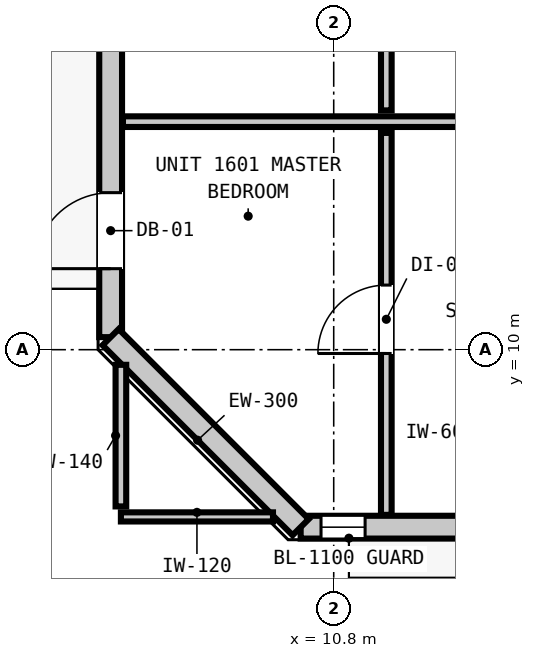
"""IFC4 building model, lengths in metres.
Left out: names, types, materials, properties, quantities, classifications, styles, units other than length and angle.
Written with IfcOpenShell. Run it as: python <this file> out.ifc"""

import sys

from ifc_helpers import new_model, si_unit, direction, frame, frame_2d, origin, place, context, subcontext, project, spatial, rectangle, extrude, element, fill, save


model = new_model("IFC4")
c1 = context("Model", 3, precision=1e-05, world=origin(), true_north=direction((0.0, 1.0)))
c2 = subcontext(c1, "Body", "Model", "MODEL_VIEW")
j1 = project(units=[si_unit("LENGTHUNIT", "METRE"), si_unit("PLANEANGLEUNIT", "RADIAN")], contexts=[c1])
p1 = place(None, origin())
s1 = spatial("IfcSite", under=j1, at=p1, CompositionType="ELEMENT")
p2 = place(p1, origin())
s2 = spatial("IfcBuilding", under=s1, at=p2, CompositionType="ELEMENT")
p3 = place(p2, frame((0.0, 0.0, 58.52)))
s3 = spatial("IfcBuildingStorey", under=s2, at=p3, CompositionType="ELEMENT", Elevation=58.52)
p4 = place(p3, frame((7.865, 10.165, 0.0), z_axis=(0.0, 0.0, 1.0), x_axis=(0.0, 1.0, 0.0)))
e1 = element("IfcWall", 1, at=p4, inside=s3, PredefinedType="STANDARD", context=c2, shape_type="SweptSolid", body=[
    extrude(rectangle(XDim=34.67, YDim=0.3, at=frame_2d((17.335, 0.0))), origin(), (0.0, 0.0, 1.0), 2.9),
])
p5 = place(p4, frame((0.901, 0.0, 0.0)))
e2 = element("IfcOpeningElement", 2, at=p5, cuts=e1, PredefinedType="OPENING", context=c2, shape_type="SweptSolid", body=[
    extrude(rectangle(XDim=1.0, YDim=2.15, at=frame_2d((0.5, 1.075))), frame((0.0, 0.16, 0.0), z_axis=(0.0, -1.0, 0.0), x_axis=(1.0, 0.0, 0.0)), (0.0, 0.0, 1.0), 0.32),
])
p6 = place(p4, frame((32.782, 0.0, 0.85)))
e3 = element("IfcOpeningElement", 3, at=p6, cuts=e1, PredefinedType="OPENING", context=c2, shape_type="SweptSolid", body=[
    extrude(rectangle(XDim=0.9, YDim=1.5, at=frame_2d((0.45, 0.75))), frame((0.0, 0.16, 0.0), z_axis=(0.0, -1.0, 0.0), x_axis=(1.0, 0.0, 0.0)), (0.0, 0.0, 1.0), 0.32),
])
p7 = place(p3, frame((47.835, 7.665, 0.0), z_axis=(0.0, 0.0, 1.0), x_axis=(-1.0, 0.0, 0.0)))
e4 = element("IfcWall", 4, at=p7, inside=s3, PredefinedType="STANDARD", context=c2, shape_type="SweptSolid", body=[
    extrude(rectangle(XDim=37.47, YDim=0.3, at=frame_2d((18.735, 0.0))), origin(), (0.0, 0.0, 1.0), 2.9),
])
p8 = place(p7, frame((0.901, 0.0, 0.0)))
e5 = element("IfcOpeningElement", 5, at=p8, cuts=e4, PredefinedType="OPENING", context=c2, shape_type="SweptSolid", body=[
    extrude(rectangle(XDim=1.0, YDim=2.15, at=frame_2d((0.5, 1.075))), frame((0.0, 0.16, 0.0), z_axis=(0.0, -1.0, 0.0), x_axis=(1.0, 0.0, 0.0)), (0.0, 0.0, 1.0), 0.32),
])
p9 = place(p7, frame((30.907, 0.0, 0.85)))
e6 = element("IfcOpeningElement", 6, at=p9, cuts=e4, PredefinedType="OPENING", context=c2, shape_type="SweptSolid", body=[
    extrude(rectangle(XDim=0.9, YDim=1.5, at=frame_2d((0.45, 0.75))), frame((0.0, 0.16, 0.0), z_axis=(0.0, -1.0, 0.0), x_axis=(1.0, 0.0, 0.0)), (0.0, 0.0, 1.0), 0.32),
])
p10 = place(p7, frame((36.622, 0.0, 0.85)))
e7 = element("IfcOpeningElement", 7, at=p10, cuts=e4, PredefinedType="OPENING", context=c2, shape_type="SweptSolid", body=[
    extrude(rectangle(XDim=0.58, YDim=1.5, at=frame_2d((0.29, 0.75))), frame((0.0, 0.16, 0.0), z_axis=(0.0, -1.0, 0.0), x_axis=(1.0, 0.0, 0.0)), (0.0, 0.0, 1.0), 0.32),
])
p11 = place(p7, frame((23.726, 0.0, 0.85)))
e8 = element("IfcOpeningElement", 8, at=p11, cuts=e4, PredefinedType="OPENING", context=c2, shape_type="SweptSolid", body=[
    extrude(rectangle(XDim=0.9, YDim=1.5, at=frame_2d((0.45, 0.75))), frame((0.0, 0.16, 0.0), z_axis=(0.0, -1.0, 0.0), x_axis=(1.0, 0.0, 0.0)), (0.0, 0.0, 1.0), 0.32),
])
p12 = place(p7, frame((16.046, 0.0, 0.85)))
e9 = element("IfcOpeningElement", 9, at=p12, cuts=e4, PredefinedType="OPENING", context=c2, shape_type="SweptSolid", body=[
    extrude(rectangle(XDim=0.9, YDim=1.5, at=frame_2d((0.45, 0.75))), frame((0.0, 0.16, 0.0), z_axis=(0.0, -1.0, 0.0), x_axis=(1.0, 0.0, 0.0)), (0.0, 0.0, 1.0), 0.32),
])
p13 = place(p7, frame((5.918, 0.0, 0.85)))
e10 = element("IfcOpeningElement", 10, at=p13, cuts=e4, PredefinedType="OPENING", context=c2, shape_type="SweptSolid", body=[
    extrude(rectangle(XDim=0.9, YDim=1.5, at=frame_2d((0.45, 0.75))), frame((0.0, 0.16, 0.0), z_axis=(0.0, -1.0, 0.0), x_axis=(1.0, 0.0, 0.0)), (0.0, 0.0, 1.0), 0.32),
])
p14 = place(p3, frame((10.365, 7.665, 0.0), z_axis=(0.0, 0.0, 1.0), x_axis=(-0.707106781187, 0.707106781187, 0.0)))
e11 = element("IfcWall", 11, at=p14, inside=s3, PredefinedType="STANDARD", context=c2, shape_type="SweptSolid", body=[
    extrude(rectangle(XDim=3.536, YDim=0.3, at=frame_2d((1.768, 0.0))), origin(), (0.0, 0.0, 1.0), 2.9),
])
p15 = place(p3, frame((8.027, 13.0, 0.0), z_axis=(0.0, 0.0, 1.0), x_axis=(1.0, 0.0, 0.0)))
e12 = element("IfcWall", 12, at=p15, inside=s3, PredefinedType="PARTITIONING", context=c2, shape_type="SweptSolid", body=[
    extrude(rectangle(XDim=24.852, YDim=0.14, at=frame_2d((12.426, 0.0))), origin(), (0.0, 0.0, 1.0), 2.9),
])
p16 = place(p15, frame((6.747, 0.0, 0.0)))
e13 = element("IfcOpeningElement", 13, at=p16, cuts=e12, PredefinedType="OPENING", context=c2, shape_type="SweptSolid", body=[
    extrude(rectangle(XDim=0.9, YDim=2.1, at=frame_2d((0.45, 1.05))), frame((0.0, 0.08, 0.0), z_axis=(0.0, -1.0, 0.0), x_axis=(1.0, 0.0, 0.0)), (0.0, 0.0, 1.0), 0.16),
])
p17 = place(p3, frame((8.0, 7.8, 0.0), z_axis=(0.0, 0.0, 1.0), x_axis=(1.0, 0.0, 0.0)))
e14 = element("IfcWall", 14, at=p17, inside=s3, PredefinedType="PARTITIONING", context=c2, shape_type="SweptSolid", body=[
    extrude(rectangle(XDim=2.001, YDim=0.12, at=frame_2d((1.0, 0.0))), origin(), (0.0, 0.0, 1.0), 2.9),
])
p18 = place(p3, frame((8.0, 7.938, 0.0), z_axis=(0.0, 0.0, 1.0), x_axis=(0.0, 1.0, 0.0)))
e15 = element("IfcWall", 15, at=p18, inside=s3, PredefinedType="PARTITIONING", context=c2, shape_type="SweptSolid", body=[
    extrude(rectangle(XDim=1.863, YDim=0.14, at=frame_2d((0.932, 0.0))), origin(), (0.0, 0.0, 1.0), 2.9),
])
p19 = place(p3, frame((11.492, 7.827, 0.0), z_axis=(0.0, 0.0, 1.0), x_axis=(0.0, 1.0, 0.0)))
e16 = element("IfcWall", 16, at=p19, inside=s3, PredefinedType="PARTITIONING", context=c2, shape_type="SweptSolid", body=[
    extrude(rectangle(XDim=5.025, YDim=0.14, at=frame_2d((2.513, 0.0))), origin(), (0.0, 0.0, 1.0), 2.9),
])
p20 = place(p19, frame((2.123, 0.0, 0.0)))
e17 = element("IfcOpeningElement", 17, at=p20, cuts=e16, PredefinedType="OPENING", context=c2, shape_type="SweptSolid", body=[
    extrude(rectangle(XDim=0.9, YDim=2.1, at=frame_2d((0.45, 1.05))), frame((0.0, 0.08, 0.0), z_axis=(0.0, -1.0, 0.0), x_axis=(1.0, 0.0, 0.0)), (0.0, 0.0, 1.0), 0.16),
])
p21 = place(p3, frame((11.492, 13.148, 0.0), z_axis=(0.0, 0.0, 1.0), x_axis=(0.0, 1.0, 0.0)))
e18 = element("IfcWall", 18, at=p21, inside=s3, PredefinedType="PARTITIONING", context=c2, shape_type="SweptSolid", body=[
    extrude(rectangle(XDim=6.134, YDim=0.14, at=frame_2d((3.067, 0.0))), origin(), (0.0, 0.0, 1.0), 2.9),
])
p22 = place(p21, frame((2.647, 0.0, 0.0)))
e19 = element("IfcOpeningElement", 19, at=p22, cuts=e18, PredefinedType="OPENING", context=c2, shape_type="SweptSolid", body=[
    extrude(rectangle(XDim=0.86, YDim=2.02, at=frame_2d((0.43, 1.01))), frame((0.0, 0.08, 0.0), z_axis=(0.0, -1.0, 0.0), x_axis=(1.0, 0.0, 0.0)), (0.0, 0.0, 1.0), 0.16),
])
p23 = place(p5, origin())
e20 = element("IfcDoor", 20, at=p23, inside=s3, OperationType="SINGLE_SWING_LEFT", PredefinedType="DOOR", context=c2, shape_type="SweptSolid", body=[
    extrude(rectangle(XDim=1.0, YDim=2.15, at=frame_2d((0.5, 1.075))), frame((0.0, 0.025, 0.0), z_axis=(0.0, -1.0, 0.0), x_axis=(1.0, 0.0, 0.0)), (0.0, 0.0, 1.0), 0.05),
])
fill(e2, e20)
p24 = place(p10, origin())
e21 = element("IfcWindow", 21, at=p24, inside=s3, PartitioningType="SINGLE_PANEL", PredefinedType="WINDOW", context=c2, shape_type="SweptSolid", body=[
    extrude(rectangle(XDim=0.58, YDim=1.5, at=frame_2d((0.29, 0.75))), frame((0.0, 0.03, 0.0), z_axis=(0.0, -1.0, 0.0), x_axis=(1.0, 0.0, 0.0)), (0.0, 0.0, 1.0), 0.06),
])
fill(e7, e21)
p25 = place(p20, origin())
e22 = element("IfcDoor", 22, at=p25, inside=s3, OperationType="SINGLE_SWING_LEFT", PredefinedType="DOOR", context=c2, shape_type="SweptSolid", body=[
    extrude(rectangle(XDim=0.9, YDim=2.1, at=frame_2d((0.45, 1.05))), frame((0.0, 0.025, 0.0), z_axis=(0.0, -1.0, 0.0), x_axis=(1.0, 0.0, 0.0)), (0.0, 0.0, 1.0), 0.05),
])
fill(e17, e22)
save(model, sys.argv[1])
